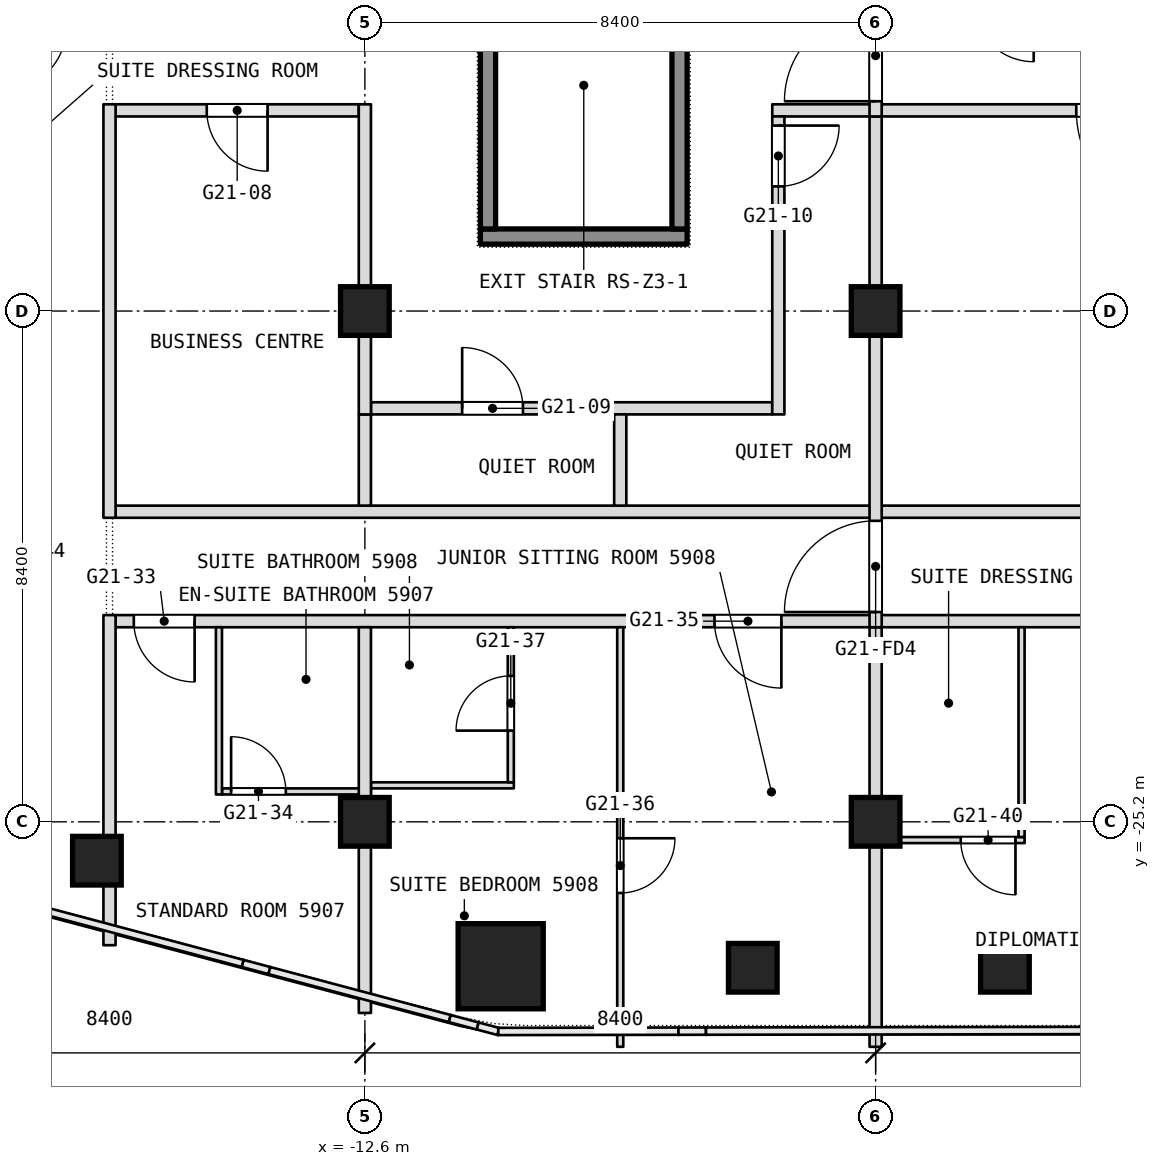
"""IFC4 building model, lengths in metres.
Left out: names, types, materials, properties, quantities, classifications, styles, units other than length and angle.
Written with IfcOpenShell. Run it as: python <this file> out.ifc"""

import sys

from ifc_helpers import new_model, si_unit, direction, frame, frame_2d, origin, origin_2d, place, context, subcontext, project, spatial, rectangle, extrude, element, fill, save


model = new_model("IFC4")
c1 = context("Model", 3, precision=1e-05, world=origin(), true_north=direction((0.0, 1.0)))
c2 = subcontext(c1, "Body", "Model", "MODEL_VIEW")
j1 = project(units=[si_unit("LENGTHUNIT", "METRE"), si_unit("PLANEANGLEUNIT", "RADIAN")], contexts=[c1])
p1 = place(None, origin())
s1 = spatial("IfcSite", under=j1, at=p1, CompositionType="ELEMENT")
p2 = place(p1, origin())
s2 = spatial("IfcBuilding", under=s1, at=p2, CompositionType="ELEMENT")
p3 = place(p2, frame((0.0, 0.0, 248.9)))
s3 = spatial("IfcBuildingStorey", under=s2, at=p3, CompositionType="ELEMENT", Elevation=248.9)
p4 = place(p3, frame((-10.366, -27.575, 0.0), z_axis=(0.0, 0.0, 1.0), x_axis=(1.0, 0.0, 0.0)))
e1 = element("IfcColumn", 1, at=p4, inside=s3, PredefinedType="COLUMN", context=c2, shape_type="SweptSolid", body=[
    extrude(rectangle(XDim=1.4, YDim=1.4, at=origin_2d()), origin(), (0.0, 0.0, 1.0), 3.6),
])
for number, where, z_axis, x_axis in (
    (2, (-12.6, -25.2, 0.0), (0.0, 0.0, 1.0), (1.0, 0.0, 0.0)),
    (3, (-12.6, -16.8, 0.0), (0.0, 0.0, 1.0), (1.0, 0.0, 0.0)),
    (4, (-4.2, -25.2, 0.0), (0.0, 0.0, 1.0), (1.0, 0.0, 0.0)),
    (5, (-4.2, -16.8, 0.0), (0.0, 0.0, 1.0), (1.0, 0.0, 0.0)),
    (6, (-2.073, -27.6, 0.0), (0.0, 0.0, 1.0), (1.0, 0.0, 0.0)),
    (7, (-6.22, -27.6, 0.0), (0.0, 0.0, 1.0), (1.0, 0.0, 0.0)),
    (8, (-17.007, -25.839, 0.0), (0.0, 0.0, 1.0), (1.0, 0.0, 0.0)),
):
    element("IfcColumn", number, at=place(p3, frame(where, z_axis=z_axis, x_axis=x_axis)), inside=s3, PredefinedType="COLUMN", context=c2, shape_type="SweptSolid", body=[
        extrude(rectangle(XDim=0.8, YDim=0.8, at=origin_2d()), origin(), (0.0, 0.0, 1.0), 3.6),
    ])
p5 = place(p3, frame((-4.1, -25.5, 0.0), z_axis=(0.0, 0.0, 1.0), x_axis=(1.0, 0.0, 0.0)))
e9 = element("IfcWall", 9, at=p5, inside=s3, PredefinedType="PARTITIONING", context=c2, shape_type="SweptSolid", body=[
    extrude(rectangle(XDim=2.35, YDim=0.1, at=frame_2d((1.175, 0.0))), origin(), (0.0, 0.0, 1.0), 3.3),
])
p6 = place(p5, frame((1.3, 0.0, 0.0)))
e10 = element("IfcOpeningElement", 10, at=p6, cuts=e9, PredefinedType="OPENING", context=c2, shape_type="SweptSolid", body=[
    extrude(rectangle(XDim=0.9, YDim=2.1, at=frame_2d((0.45, 1.05))), frame((0.0, 0.05, 0.0), z_axis=(0.0, -1.0, 0.0), x_axis=(1.0, 0.0, 0.0)), (0.0, 0.0, 1.0), 0.1),
])
p7 = place(p3, frame((-14.95, -24.7, 0.0), z_axis=(0.0, 0.0, 1.0), x_axis=(1.0, 0.0, 0.0)))
e11 = element("IfcWall", 11, at=p7, inside=s3, PredefinedType="PARTITIONING", context=c2, shape_type="SweptSolid", body=[
    extrude(rectangle(XDim=2.45, YDim=0.1, at=frame_2d((1.225, 0.0))), origin(), (0.0, 0.0, 1.0), 3.3),
])
p8 = place(p7, frame((0.15, 0.0, 0.0)))
e12 = element("IfcOpeningElement", 12, at=p8, cuts=e11, PredefinedType="OPENING", context=c2, shape_type="SweptSolid", body=[
    extrude(rectangle(XDim=0.9, YDim=2.1, at=frame_2d((0.45, 1.05))), frame((0.0, 0.05, 0.0), z_axis=(0.0, -1.0, 0.0), x_axis=(1.0, 0.0, 0.0)), (0.0, 0.0, 1.0), 0.1),
])
p9 = place(p3, frame((-12.5, -24.6, 0.0), z_axis=(0.0, 0.0, 1.0), x_axis=(1.0, 0.0, 0.0)))
e13 = element("IfcWall", 13, at=p9, inside=s3, PredefinedType="PARTITIONING", context=c2, shape_type="SweptSolid", body=[
    extrude(rectangle(XDim=2.35, YDim=0.1, at=frame_2d((1.175, 0.0))), origin(), (0.0, 0.0, 1.0), 3.3),
])
p10 = place(p3, frame((-16.7, -21.9, 0.0), z_axis=(0.0, 0.0, 1.0), x_axis=(1.0, 0.0, 0.0)))
e14 = element("IfcWall", 14, at=p10, inside=s3, PredefinedType="PARTITIONING", context=c2, shape_type="SweptSolid", body=[
    extrude(rectangle(XDim=33.4, YDim=0.2, at=frame_2d((16.7, 0.0))), origin(), (0.0, 0.0, 1.0), 3.3),
])
p11 = place(p10, frame((0.3, 0.0, 0.0)))
e15 = element("IfcOpeningElement", 15, at=p11, cuts=e14, PredefinedType="OPENING", context=c2, shape_type="SweptSolid", body=[
    extrude(rectangle(XDim=1.0, YDim=2.1, at=frame_2d((0.5, 1.05))), frame((0.0, 0.1, 0.0), z_axis=(0.0, -1.0, 0.0), x_axis=(1.0, 0.0, 0.0)), (0.0, 0.0, 1.0), 0.2),
])
p12 = place(p10, frame((9.85, 0.0, 0.0)))
e16 = element("IfcOpeningElement", 16, at=p12, cuts=e14, PredefinedType="OPENING", context=c2, shape_type="SweptSolid", body=[
    extrude(rectangle(XDim=1.1, YDim=2.1, at=frame_2d((0.55, 1.05))), frame((0.0, 0.1, 0.0), z_axis=(0.0, -1.0, 0.0), x_axis=(1.0, 0.0, 0.0)), (0.0, 0.0, 1.0), 0.2),
])
p13 = place(p10, frame((16.1, 0.0, 0.0)))
e17 = element("IfcOpeningElement", 17, at=p13, cuts=e14, PredefinedType="OPENING", context=c2, shape_type="SweptSolid", body=[
    extrude(rectangle(XDim=1.1, YDim=2.1, at=frame_2d((0.55, 1.05))), frame((0.0, 0.1, 0.0), z_axis=(0.0, -1.0, 0.0), x_axis=(1.0, 0.0, 0.0)), (0.0, 0.0, 1.0), 0.2),
])
p14 = place(p10, frame((24.2, 0.0, 0.0)))
e18 = element("IfcOpeningElement", 18, at=p14, cuts=e14, PredefinedType="OPENING", context=c2, shape_type="SweptSolid", body=[
    extrude(rectangle(XDim=1.8, YDim=2.1, at=frame_2d((0.9, 1.05))), frame((0.0, 0.1, 0.0), z_axis=(0.0, -1.0, 0.0), x_axis=(1.0, 0.0, 0.0)), (0.0, 0.0, 1.0), 0.2),
])
p15 = place(p10, frame((29.7, 0.0, 0.0)))
e19 = element("IfcOpeningElement", 19, at=p15, cuts=e14, PredefinedType="OPENING", context=c2, shape_type="SweptSolid", body=[
    extrude(rectangle(XDim=1.0, YDim=2.1, at=frame_2d((0.5, 1.05))), frame((0.0, 0.1, 0.0), z_axis=(0.0, -1.0, 0.0), x_axis=(1.0, 0.0, 0.0)), (0.0, 0.0, 1.0), 0.2),
])
p16 = place(p3, frame((-16.7, -20.1, 0.0), z_axis=(0.0, 0.0, 1.0), x_axis=(1.0, 0.0, 0.0)))
e20 = element("IfcWall", 20, at=p16, inside=s3, PredefinedType="PARTITIONING", context=c2, shape_type="SweptSolid", body=[
    extrude(rectangle(XDim=33.4, YDim=0.2, at=frame_2d((16.7, 0.0))), origin(), (0.0, 0.0, 1.0), 3.3),
])
p17 = place(p3, frame((-12.5, -18.4, 0.0), z_axis=(0.0, 0.0, 1.0), x_axis=(1.0, 0.0, 0.0)))
e21 = element("IfcWall", 21, at=p17, inside=s3, PredefinedType="PARTITIONING", context=c2, shape_type="SweptSolid", body=[
    extrude(rectangle(XDim=6.6, YDim=0.2, at=frame_2d((3.3, 0.0))), origin(), (0.0, 0.0, 1.0), 3.3),
])
p18 = place(p17, frame((1.5, 0.0, 0.0)))
e22 = element("IfcOpeningElement", 22, at=p18, cuts=e21, PredefinedType="OPENING", context=c2, shape_type="SweptSolid", body=[
    extrude(rectangle(XDim=1.0, YDim=2.1, at=frame_2d((0.5, 1.05))), frame((0.0, 0.1, 0.0), z_axis=(0.0, -1.0, 0.0), x_axis=(1.0, 0.0, 0.0)), (0.0, 0.0, 1.0), 0.2),
])
p19 = place(p3, frame((-16.7, -13.5, 0.0), z_axis=(0.0, 0.0, 1.0), x_axis=(1.0, 0.0, 0.0)))
e23 = element("IfcWall", 23, at=p19, inside=s3, PredefinedType="PARTITIONING", context=c2, shape_type="SweptSolid", body=[
    extrude(rectangle(XDim=4.0, YDim=0.2, at=frame_2d((2.0, 0.0))), origin(), (0.0, 0.0, 1.0), 3.3),
])
p20 = place(p19, frame((1.5, 0.0, 0.0)))
e24 = element("IfcOpeningElement", 24, at=p20, cuts=e23, PredefinedType="OPENING", context=c2, shape_type="SweptSolid", body=[
    extrude(rectangle(XDim=1.0, YDim=2.1, at=frame_2d((0.5, 1.05))), frame((0.0, 0.1, 0.0), z_axis=(0.0, -1.0, 0.0), x_axis=(1.0, 0.0, 0.0)), (0.0, 0.0, 1.0), 0.2),
])
p21 = place(p3, frame((-5.9, -13.5, 0.0), z_axis=(0.0, 0.0, 1.0), x_axis=(1.0, 0.0, 0.0)))
e25 = element("IfcWall", 25, at=p21, inside=s3, PredefinedType="PARTITIONING", context=c2, shape_type="SweptSolid", body=[
    extrude(rectangle(XDim=11.6, YDim=0.2, at=frame_2d((5.8, 0.0))), origin(), (0.0, 0.0, 1.0), 3.3),
])
p22 = place(p21, frame((5.0, 0.0, 0.0)))
e26 = element("IfcOpeningElement", 26, at=p22, cuts=e25, PredefinedType="OPENING", context=c2, shape_type="SweptSolid", body=[
    extrude(rectangle(XDim=1.8, YDim=2.1, at=frame_2d((0.9, 1.05))), frame((0.0, 0.1, 0.0), z_axis=(0.0, -1.0, 0.0), x_axis=(1.0, 0.0, 0.0)), (0.0, 0.0, 1.0), 0.2),
])
p23 = place(p3, frame((-1.8, -25.45, 0.0), z_axis=(0.0, 0.0, 1.0), x_axis=(0.0, 1.0, 0.0)))
e27 = element("IfcWall", 27, at=p23, inside=s3, PredefinedType="PARTITIONING", context=c2, shape_type="SweptSolid", body=[
    extrude(rectangle(XDim=3.45, YDim=0.1, at=frame_2d((1.725, 0.0))), origin(), (0.0, 0.0, 1.0), 3.3),
])
p24 = place(p3, frame((-4.2, -28.9, 0.0), z_axis=(0.0, 0.0, 1.0), x_axis=(0.0, 1.0, 0.0)))
e28 = element("IfcWall", 28, at=p24, inside=s3, PredefinedType="PARTITIONING", context=c2, shape_type="SweptSolid", body=[
    extrude(rectangle(XDim=6.9, YDim=0.2, at=frame_2d((3.45, 0.0))), origin(), (0.0, 0.0, 1.0), 2.486),
])
p25 = place(p3, frame((-4.2, -22.0, 0.0), z_axis=(0.0, 0.0, 1.0), x_axis=(0.0, 1.0, 0.0)))
e29 = element("IfcWall", 29, at=p25, inside=s3, PredefinedType="PARTITIONING", context=c2, shape_type="SweptSolid", body=[
    extrude(rectangle(XDim=8.4, YDim=0.2, at=frame_2d((4.2, 0.0))), origin(), (0.0, 0.0, 1.0), 2.486),
])
p26 = place(p25, frame((0.25, 0.0, 0.0)))
e30 = element("IfcOpeningElement", 30, at=p26, cuts=e29, PredefinedType="OPENING", context=c2, shape_type="SweptSolid", body=[
    extrude(rectangle(XDim=1.5, YDim=2.1, at=frame_2d((0.75, 1.05))), frame((0.0, 0.1, 0.0), z_axis=(0.0, -1.0, 0.0), x_axis=(1.0, 0.0, 0.0)), (0.0, 0.0, 1.0), 0.2),
])
p27 = place(p3, frame((-4.2, -13.6, 0.0), z_axis=(0.0, 0.0, 1.0), x_axis=(0.0, 1.0, 0.0)))
e31 = element("IfcWall", 31, at=p27, inside=s3, PredefinedType="PARTITIONING", context=c2, shape_type="SweptSolid", body=[
    extrude(rectangle(XDim=13.6, YDim=0.2, at=frame_2d((6.8, 0.0))), origin(), (0.0, 0.0, 1.0), 2.486),
])
p28 = place(p27, frame((11.95, 0.0, 0.0)))
e32 = element("IfcOpeningElement", 32, at=p28, cuts=e31, PredefinedType="OPENING", context=c2, shape_type="SweptSolid", body=[
    extrude(rectangle(XDim=1.5, YDim=2.1, at=frame_2d((0.75, 1.05))), frame((0.0, 0.1, 0.0), z_axis=(0.0, -1.0, 0.0), x_axis=(1.0, 0.0, 0.0)), (0.0, 0.0, 1.0), 0.2),
])
p29 = place(p27, frame((0.25, 0.0, 0.0)))
e33 = element("IfcOpeningElement", 33, at=p29, cuts=e31, PredefinedType="OPENING", context=c2, shape_type="SweptSolid", body=[
    extrude(rectangle(XDim=1.5, YDim=2.1, at=frame_2d((0.75, 1.05))), frame((0.0, 0.1, 0.0), z_axis=(0.0, -1.0, 0.0), x_axis=(1.0, 0.0, 0.0)), (0.0, 0.0, 1.0), 0.2),
])
p30 = place(p3, frame((-5.8, -18.5, 0.0), z_axis=(0.0, 0.0, 1.0), x_axis=(0.0, 1.0, 0.0)))
e34 = element("IfcWall", 34, at=p30, inside=s3, PredefinedType="PARTITIONING", context=c2, shape_type="SweptSolid", body=[
    extrude(rectangle(XDim=4.9, YDim=0.2, at=frame_2d((2.45, 0.0))), origin(), (0.0, 0.0, 1.0), 3.3),
])
p31 = place(p30, frame((3.75, 0.0, 0.0)))
e35 = element("IfcOpeningElement", 35, at=p31, cuts=e34, PredefinedType="OPENING", context=c2, shape_type="SweptSolid", body=[
    extrude(rectangle(XDim=1.0, YDim=2.1, at=frame_2d((0.5, 1.05))), frame((0.0, 0.1, 0.0), z_axis=(0.0, -1.0, 0.0), x_axis=(1.0, 0.0, 0.0)), (0.0, 0.0, 1.0), 0.2),
])
p32 = place(p3, frame((-8.4, -28.9, 0.0), z_axis=(0.0, 0.0, 1.0), x_axis=(0.0, 1.0, 0.0)))
e36 = element("IfcWall", 36, at=p32, inside=s3, PredefinedType="PARTITIONING", context=c2, shape_type="SweptSolid", body=[
    extrude(rectangle(XDim=6.9, YDim=0.1, at=frame_2d((3.45, 0.0))), origin(), (0.0, 0.0, 1.0), 3.3),
])
p33 = place(p32, frame((2.53, 0.0, 0.0)))
e37 = element("IfcOpeningElement", 37, at=p33, cuts=e36, PredefinedType="OPENING", context=c2, shape_type="SweptSolid", body=[
    extrude(rectangle(XDim=0.9, YDim=2.1, at=frame_2d((0.45, 1.05))), frame((0.0, 0.05, 0.0), z_axis=(0.0, -1.0, 0.0), x_axis=(1.0, 0.0, 0.0)), (0.0, 0.0, 1.0), 0.1),
])
p34 = place(p3, frame((-8.4, -20.0, 0.0), z_axis=(0.0, 0.0, 1.0), x_axis=(0.0, 1.0, 0.0)))
e38 = element("IfcWall", 38, at=p34, inside=s3, PredefinedType="PARTITIONING", context=c2, shape_type="SweptSolid", body=[
    extrude(rectangle(XDim=1.5, YDim=0.2, at=frame_2d((0.75, 0.0))), origin(), (0.0, 0.0, 1.0), 3.3),
])
p35 = place(p3, frame((-10.2, -24.55, 0.0), z_axis=(0.0, 0.0, 1.0), x_axis=(0.0, 1.0, 0.0)))
e39 = element("IfcWall", 39, at=p35, inside=s3, PredefinedType="PARTITIONING", context=c2, shape_type="SweptSolid", body=[
    extrude(rectangle(XDim=2.55, YDim=0.1, at=frame_2d((1.275, 0.0))), origin(), (0.0, 0.0, 1.0), 3.3),
])
p36 = place(p35, frame((0.85, 0.0, 0.0)))
e40 = element("IfcOpeningElement", 40, at=p36, cuts=e39, PredefinedType="OPENING", context=c2, shape_type="SweptSolid", body=[
    extrude(rectangle(XDim=0.9, YDim=2.1, at=frame_2d((0.45, 1.05))), frame((0.0, 0.05, 0.0), z_axis=(0.0, -1.0, 0.0), x_axis=(1.0, 0.0, 0.0)), (0.0, 0.0, 1.0), 0.1),
])
p37 = place(p3, frame((-12.6, -28.343, 0.0), z_axis=(0.0, 0.0, 1.0), x_axis=(0.0, 1.0, 0.0)))
e41 = element("IfcWall", 41, at=p37, inside=s3, PredefinedType="PARTITIONING", context=c2, shape_type="SweptSolid", body=[
    extrude(rectangle(XDim=6.343, YDim=0.2, at=frame_2d((3.171, 0.0))), origin(), (0.0, 0.0, 1.0), 2.486),
])
p38 = place(p3, frame((-12.6, -20.0, 0.0), z_axis=(0.0, 0.0, 1.0), x_axis=(0.0, 1.0, 0.0)))
e42 = element("IfcWall", 42, at=p38, inside=s3, PredefinedType="PARTITIONING", context=c2, shape_type="SweptSolid", body=[
    extrude(rectangle(XDim=1.5, YDim=0.2, at=frame_2d((0.75, 0.0))), origin(), (0.0, 0.0, 1.0), 2.486),
])
p39 = place(p3, frame((-12.6, -18.5, 0.0), z_axis=(0.0, 0.0, 1.0), x_axis=(0.0, 1.0, 0.0)))
e43 = element("IfcWall", 43, at=p39, inside=s3, PredefinedType="PARTITIONING", context=c2, shape_type="SweptSolid", body=[
    extrude(rectangle(XDim=5.1, YDim=0.2, at=frame_2d((2.55, 0.0))), origin(), (0.0, 0.0, 1.0), 2.486),
])
p40 = place(p3, frame((-15.0, -24.75, 0.0), z_axis=(0.0, 0.0, 1.0), x_axis=(0.0, 1.0, 0.0)))
e44 = element("IfcWall", 44, at=p40, inside=s3, PredefinedType="PARTITIONING", context=c2, shape_type="SweptSolid", body=[
    extrude(rectangle(XDim=2.75, YDim=0.1, at=frame_2d((1.375, 0.0))), origin(), (0.0, 0.0, 1.0), 3.3),
])
p41 = place(p3, frame((-16.8, -27.229, 0.0), z_axis=(0.0, 0.0, 1.0), x_axis=(0.0, 1.0, 0.0)))
e45 = element("IfcWall", 45, at=p41, inside=s3, PredefinedType="PARTITIONING", context=c2, shape_type="SweptSolid", body=[
    extrude(rectangle(XDim=5.429, YDim=0.2, at=frame_2d((2.714, 0.0))), origin(), (0.0, 0.0, 1.0), 3.3),
])
p42 = place(p3, frame((-16.8, -20.2, 0.0), z_axis=(0.0, 0.0, 1.0), x_axis=(0.0, 1.0, 0.0)))
e46 = element("IfcWall", 46, at=p42, inside=s3, PredefinedType="PARTITIONING", context=c2, shape_type="SweptSolid", body=[
    extrude(rectangle(XDim=6.8, YDim=0.2, at=frame_2d((3.4, 0.0))), origin(), (0.0, 0.0, 1.0), 3.3),
])
p43 = place(p3, frame((-10.7, -15.575, 0.1), z_axis=(0.0, 0.0, 1.0), x_axis=(1.0, 0.0, 0.0)))
e47 = element("IfcWall", 47, at=p43, inside=s3, PredefinedType="SHEAR", context=c2, shape_type="SweptSolid", body=[
    extrude(rectangle(XDim=3.4, YDim=0.25, at=frame_2d((1.7, 0.0))), origin(), (0.0, 0.0, 1.0), 3.2),
])
for number, where, z_axis, x_axis in (
    (48, (-10.575, -15.45, 0.1), (0.0, 0.0, 1.0), (0.0, 1.0, 0.0)),
    (49, (-7.425, -15.45, 0.1), (0.0, 0.0, 1.0), (0.0, 1.0, 0.0)),
):
    element("IfcWall", number, at=place(p3, frame(where, z_axis=z_axis, x_axis=x_axis)), inside=s3, PredefinedType="SHEAR", context=c2, shape_type="SweptSolid", body=[
        extrude(rectangle(XDim=5.7, YDim=0.25, at=frame_2d((2.85, 0.0))), origin(), (0.0, 0.0, 1.0), 3.2),
    ])
p44 = place(p6, origin())
e50 = element("IfcDoor", 50, at=p44, inside=s3, OperationType="SINGLE_SWING_RIGHT", PredefinedType="DOOR", context=c2, shape_type="SweptSolid", body=[
    extrude(rectangle(XDim=0.9, YDim=2.1, at=frame_2d((0.45, 1.05))), frame((0.0, 0.025, 0.0), z_axis=(0.0, -1.0, 0.0), x_axis=(1.0, 0.0, 0.0)), (0.0, 0.0, 1.0), 0.05),
])
fill(e10, e50)
p45 = place(p8, origin())
e51 = element("IfcDoor", 51, at=p45, inside=s3, OperationType="SINGLE_SWING_LEFT", PredefinedType="DOOR", context=c2, shape_type="SweptSolid", body=[
    extrude(rectangle(XDim=0.9, YDim=2.1, at=frame_2d((0.45, 1.05))), frame((0.0, 0.025, 0.0), z_axis=(0.0, -1.0, 0.0), x_axis=(1.0, 0.0, 0.0)), (0.0, 0.0, 1.0), 0.05),
])
fill(e12, e51)
p46 = place(p11, origin())
e52 = element("IfcDoor", 52, at=p46, inside=s3, OperationType="SINGLE_SWING_RIGHT", PredefinedType="DOOR", context=c2, shape_type="SweptSolid", body=[
    extrude(rectangle(XDim=1.0, YDim=2.1, at=frame_2d((0.5, 1.05))), frame((0.0, 0.025, 0.0), z_axis=(0.0, -1.0, 0.0), x_axis=(1.0, 0.0, 0.0)), (0.0, 0.0, 1.0), 0.05),
])
fill(e15, e52)
p47 = place(p12, origin())
e53 = element("IfcDoor", 53, at=p47, inside=s3, OperationType="SINGLE_SWING_LEFT", PredefinedType="DOOR", context=c2, shape_type="SweptSolid", body=[
    extrude(rectangle(XDim=1.1, YDim=2.1, at=frame_2d((0.55, 1.05))), frame((0.0, 0.025, 0.0), z_axis=(0.0, -1.0, 0.0), x_axis=(1.0, 0.0, 0.0)), (0.0, 0.0, 1.0), 0.05),
])
fill(e16, e53)
p48 = place(p18, origin())
e54 = element("IfcDoor", 54, at=p48, inside=s3, OperationType="SINGLE_SWING_RIGHT", PredefinedType="DOOR", context=c2, shape_type="SweptSolid", body=[
    extrude(rectangle(XDim=1.0, YDim=2.1, at=frame_2d((0.5, 1.05))), frame((0.0, 0.025, 0.0), z_axis=(0.0, -1.0, 0.0), x_axis=(1.0, 0.0, 0.0)), (0.0, 0.0, 1.0), 0.05),
])
fill(e22, e54)
p49 = place(p20, origin())
e55 = element("IfcDoor", 55, at=p49, inside=s3, OperationType="SINGLE_SWING_RIGHT", PredefinedType="DOOR", context=c2, shape_type="SweptSolid", body=[
    extrude(rectangle(XDim=1.0, YDim=2.1, at=frame_2d((0.5, 1.05))), frame((0.0, 0.025, 0.0), z_axis=(0.0, -1.0, 0.0), x_axis=(1.0, 0.0, 0.0)), (0.0, 0.0, 1.0), 0.05),
])
fill(e24, e55)
p50 = place(p22, origin())
e56 = element("IfcDoor", 56, at=p50, inside=s3, OperationType="DOUBLE_DOOR_SINGLE_SWING", PredefinedType="DOOR", context=c2, shape_type="SweptSolid", body=[
    extrude(rectangle(XDim=1.8, YDim=2.1, at=frame_2d((0.9, 1.05))), frame((0.0, 0.025, 0.0), z_axis=(0.0, -1.0, 0.0), x_axis=(1.0, 0.0, 0.0)), (0.0, 0.0, 1.0), 0.05),
])
fill(e26, e56)
p51 = place(p31, origin())
e57 = element("IfcDoor", 57, at=p51, inside=s3, OperationType="SINGLE_SWING_RIGHT", PredefinedType="DOOR", context=c2, shape_type="SweptSolid", body=[
    extrude(rectangle(XDim=1.0, YDim=2.1, at=frame_2d((0.5, 1.05))), frame((0.0, 0.025, 0.0), z_axis=(0.0, -1.0, 0.0), x_axis=(1.0, 0.0, 0.0)), (0.0, 0.0, 1.0), 0.05),
])
fill(e35, e57)
p52 = place(p33, origin())
e58 = element("IfcDoor", 58, at=p52, inside=s3, OperationType="SINGLE_SWING_LEFT", PredefinedType="DOOR", context=c2, shape_type="SweptSolid", body=[
    extrude(rectangle(XDim=0.9, YDim=2.1, at=frame_2d((0.45, 1.05))), frame((0.0, 0.025, 0.0), z_axis=(0.0, -1.0, 0.0), x_axis=(1.0, 0.0, 0.0)), (0.0, 0.0, 1.0), 0.05),
])
fill(e37, e58)
p53 = place(p36, origin())
e59 = element("IfcDoor", 59, at=p53, inside=s3, OperationType="SINGLE_SWING_RIGHT", PredefinedType="DOOR", context=c2, shape_type="SweptSolid", body=[
    extrude(rectangle(XDim=0.9, YDim=2.1, at=frame_2d((0.45, 1.05))), frame((0.0, 0.025, 0.0), z_axis=(0.0, -1.0, 0.0), x_axis=(1.0, 0.0, 0.0)), (0.0, 0.0, 1.0), 0.05),
])
fill(e40, e59)
p54 = place(p29, origin())
e60 = element("IfcDoor", 60, at=p54, inside=s3, OperationType="DOUBLE_DOOR_DOUBLE_SWING", PredefinedType="DOOR", context=c2, shape_type="SweptSolid", body=[
    extrude(rectangle(XDim=1.5, YDim=2.1, at=frame_2d((0.75, 1.05))), frame((0.0, 0.025, 0.0), z_axis=(0.0, -1.0, 0.0), x_axis=(1.0, 0.0, 0.0)), (0.0, 0.0, 1.0), 0.05),
])
fill(e33, e60)
p55 = place(p26, origin())
e61 = element("IfcDoor", 61, at=p55, inside=s3, OperationType="DOUBLE_DOOR_DOUBLE_SWING", PredefinedType="DOOR", context=c2, shape_type="SweptSolid", body=[
    extrude(rectangle(XDim=1.5, YDim=2.1, at=frame_2d((0.75, 1.05))), frame((0.0, 0.025, 0.0), z_axis=(0.0, -1.0, 0.0), x_axis=(1.0, 0.0, 0.0)), (0.0, 0.0, 1.0), 0.05),
])
fill(e30, e61)
save(model, sys.argv[1])
